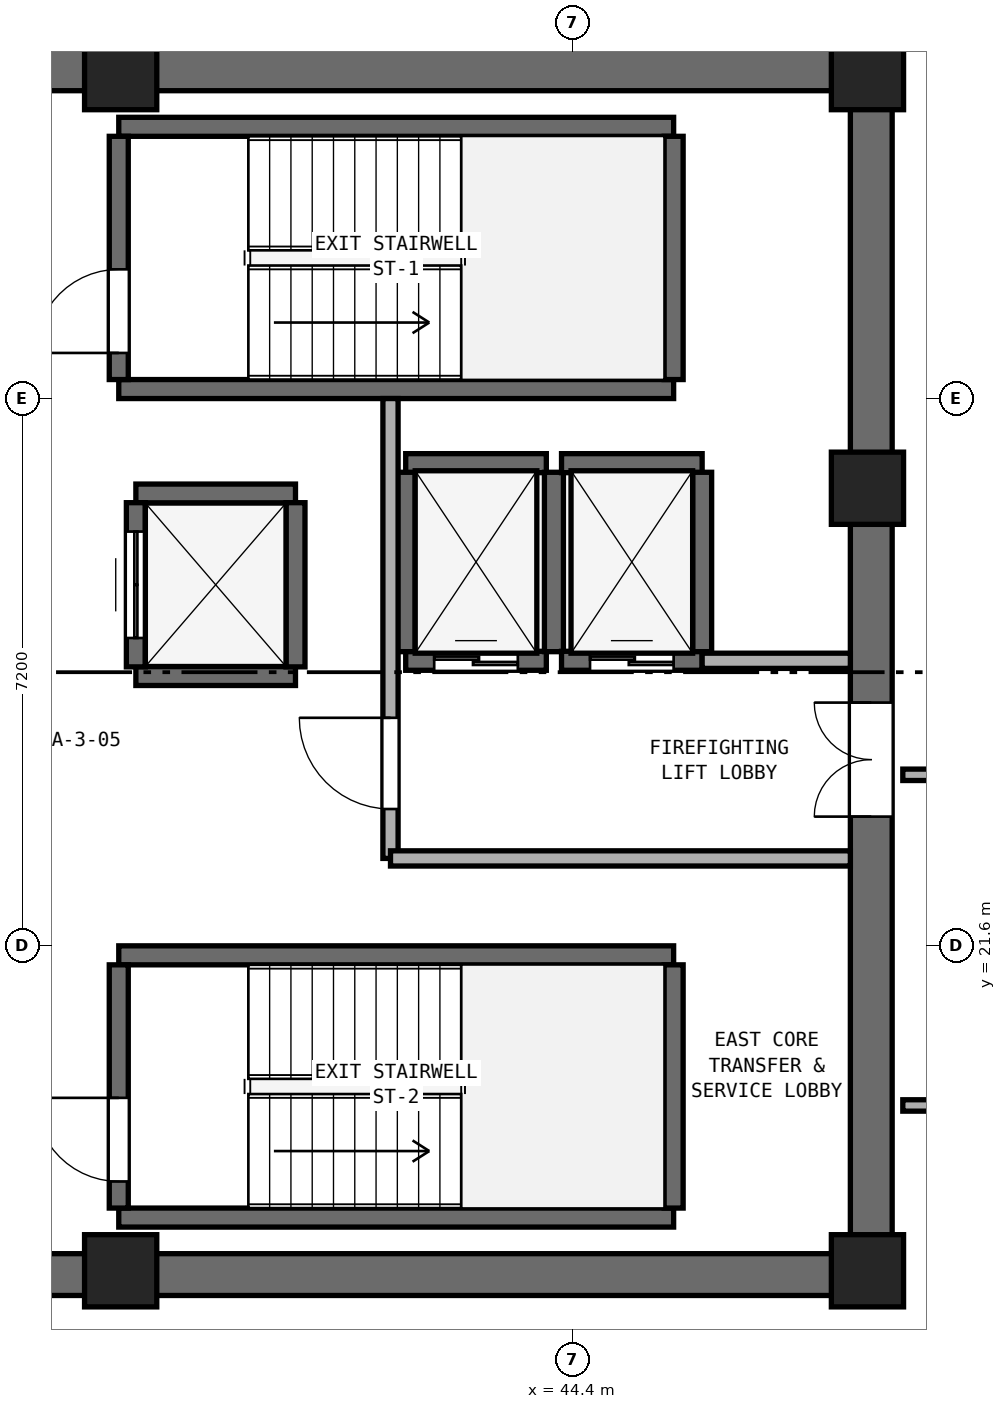
"""IFC4 building model, lengths in metres.
Left out: names, types, materials, properties, quantities, classifications, styles, units other than length and angle.
Written with IfcOpenShell. Run it as: python <this file> out.ifc"""

import sys

from ifc_helpers import new_model, si_unit, direction, frame, frame_2d, origin, origin_2d, place, context, subcontext, project, spatial, rectangle, extrude, element, fill, save


model = new_model("IFC4")
c1 = context("Model", 3, precision=1e-05, world=origin(), true_north=direction((0.0, 1.0)))
c2 = subcontext(c1, "Body", "Model", "MODEL_VIEW")
j1 = project(units=[si_unit("LENGTHUNIT", "METRE"), si_unit("PLANEANGLEUNIT", "RADIAN")], contexts=[c1])
p1 = place(None, origin())
s1 = spatial("IfcSite", under=j1, at=p1, CompositionType="ELEMENT")
p2 = place(p1, origin())
s2 = spatial("IfcBuilding", under=s1, at=p2, CompositionType="ELEMENT")
p3 = place(p2, frame((0.0, 0.0, 185.8)))
s3 = spatial("IfcBuildingStorey", under=s2, at=p3, CompositionType="ELEMENT", Elevation=185.8)
for number, where, z_axis, x_axis in (
    (1, (25.4, 17.275, 0.0), (0.0, 0.0, 1.0), (1.0, 0.0, 0.0)),
    (2, (25.4, 33.125, 0.0), (0.0, 0.0, 1.0), (1.0, 0.0, 0.0)),
):
    element("IfcWall", number, at=place(p3, frame(where, z_axis=z_axis, x_axis=x_axis)), inside=s3, PredefinedType="SHEAR", context=c2, shape_type="SweptSolid", body=[
        extrude(rectangle(XDim=23.2, YDim=0.55, at=frame_2d((11.6, 0.0))), origin(), (0.0, 0.0, 1.0), 3.54),
    ])
p4 = place(p3, frame((48.325, 17.55, 0.0), z_axis=(0.0, 0.0, 1.0), x_axis=(0.0, 1.0, 0.0)))
e3 = element("IfcWall", 3, at=p4, inside=s3, PredefinedType="SHEAR", context=c2, shape_type="SweptSolid", body=[
    extrude(rectangle(XDim=15.3, YDim=0.55, at=frame_2d((7.65, 0.0))), origin(), (0.0, 0.0, 1.0), 3.54),
])
p5 = place(p4, frame((5.75, 0.0, 0.0)))
e4 = element("IfcOpeningElement", 4, at=p5, cuts=e3, PredefinedType="OPENING", context=c2, shape_type="SweptSolid", body=[
    extrude(rectangle(XDim=1.5, YDim=2.15, at=frame_2d((0.75, 1.075))), frame((0.0, 0.285, 0.0), z_axis=(0.0, -1.0, 0.0), x_axis=(1.0, 0.0, 0.0)), (0.0, 0.0, 1.0), 0.57),
])
for number, where, z_axis, x_axis in (
    (5, (38.45, 17.325, 0.0), (0.0, 0.0, 1.0), (1.0, 0.0, 0.0)),
    (6, (48.275, 17.325, 0.0), (0.0, 0.0, 1.0), (1.0, 0.0, 0.0)),
    (7, (48.275, 27.62, 0.0), (0.0, 0.0, 1.0), (1.0, 0.0, 0.0)),
    (8, (48.275, 33.075, 0.0), (0.0, 0.0, 1.0), (1.0, 0.0, 0.0)),
    (9, (38.45, 33.075, 0.0), (0.0, 0.0, 1.0), (1.0, 0.0, 0.0)),
):
    element("IfcColumn", number, at=place(p3, frame(where, z_axis=z_axis, x_axis=x_axis)), inside=s3, PredefinedType="PILASTER", context=c2, shape_type="SweptSolid", body=[
        extrude(rectangle(XDim=0.95, YDim=0.95, at=origin_2d()), origin(), (0.0, 0.0, 1.0), 3.8),
    ])
for number, where, z_axis, x_axis in (
    (10, (38.425, 28.925, 0.0), (0.0, 0.0, 1.0), (1.0, 0.0, 0.0)),
    (11, (38.425, 32.375, 0.0), (0.0, 0.0, 1.0), (1.0, 0.0, 0.0)),
):
    element("IfcWall", number, at=place(p3, frame(where, z_axis=z_axis, x_axis=x_axis)), inside=s3, PredefinedType="SHEAR", context=c2, shape_type="SweptSolid", body=[
        extrude(rectangle(XDim=7.3, YDim=0.25, at=frame_2d((3.65, 0.0))), origin(), (0.0, 0.0, 1.0), 3.54),
    ])
p6 = place(p3, frame((38.425, 29.05, 0.0), z_axis=(0.0, 0.0, 1.0), x_axis=(0.0, 1.0, 0.0)))
e12 = element("IfcWall", 12, at=p6, inside=s3, PredefinedType="SHEAR", context=c2, shape_type="SweptSolid", body=[
    extrude(rectangle(XDim=3.2, YDim=0.25, at=frame_2d((1.6, 0.0))), origin(), (0.0, 0.0, 1.0), 3.54),
])
p7 = place(p6, frame((0.35, 0.0, 0.0)))
e13 = element("IfcOpeningElement", 13, at=p7, cuts=e12, PredefinedType="OPENING", context=c2, shape_type="SweptSolid", body=[
    extrude(rectangle(XDim=1.1, YDim=2.15, at=frame_2d((0.55, 1.075))), frame((0.0, 0.135, 0.0), z_axis=(0.0, -1.0, 0.0), x_axis=(1.0, 0.0, 0.0)), (0.0, 0.0, 1.0), 0.27),
])
p8 = place(p3, frame((45.725, 29.05, 0.0), z_axis=(0.0, 0.0, 1.0), x_axis=(0.0, 1.0, 0.0)))
e14 = element("IfcWall", 14, at=p8, inside=s3, PredefinedType="SHEAR", context=c2, shape_type="SweptSolid", body=[
    extrude(rectangle(XDim=3.2, YDim=0.25, at=frame_2d((1.6, 0.0))), origin(), (0.0, 0.0, 1.0), 3.54),
])
for number, where, z_axis, x_axis in (
    (15, (38.425, 18.025, 0.0), (0.0, 0.0, 1.0), (1.0, 0.0, 0.0)),
    (16, (38.425, 21.475, 0.0), (0.0, 0.0, 1.0), (1.0, 0.0, 0.0)),
):
    element("IfcWall", number, at=place(p3, frame(where, z_axis=z_axis, x_axis=x_axis)), inside=s3, PredefinedType="SHEAR", context=c2, shape_type="SweptSolid", body=[
        extrude(rectangle(XDim=7.3, YDim=0.25, at=frame_2d((3.65, 0.0))), origin(), (0.0, 0.0, 1.0), 3.54),
    ])
p9 = place(p3, frame((38.425, 18.15, 0.0), z_axis=(0.0, 0.0, 1.0), x_axis=(0.0, 1.0, 0.0)))
e17 = element("IfcWall", 17, at=p9, inside=s3, PredefinedType="SHEAR", context=c2, shape_type="SweptSolid", body=[
    extrude(rectangle(XDim=3.2, YDim=0.25, at=frame_2d((1.6, 0.0))), origin(), (0.0, 0.0, 1.0), 3.54),
])
p10 = place(p9, frame((0.35, 0.0, 0.0)))
e18 = element("IfcOpeningElement", 18, at=p10, cuts=e17, PredefinedType="OPENING", context=c2, shape_type="SweptSolid", body=[
    extrude(rectangle(XDim=1.1, YDim=2.15, at=frame_2d((0.55, 1.075))), frame((0.0, 0.135, 0.0), z_axis=(0.0, -1.0, 0.0), x_axis=(1.0, 0.0, 0.0)), (0.0, 0.0, 1.0), 0.27),
])
p11 = place(p3, frame((45.725, 18.15, 0.0), z_axis=(0.0, 0.0, 1.0), x_axis=(0.0, 1.0, 0.0)))
e19 = element("IfcWall", 19, at=p11, inside=s3, PredefinedType="SHEAR", context=c2, shape_type="SweptSolid", body=[
    extrude(rectangle(XDim=3.2, YDim=0.25, at=frame_2d((1.6, 0.0))), origin(), (0.0, 0.0, 1.0), 3.54),
])
p12 = place(p3, frame((42.2, 25.35, 0.0), z_axis=(0.0, 0.0, 1.0), x_axis=(1.0, 0.0, 0.0)))
e20 = element("IfcWall", 20, at=p12, inside=s3, PredefinedType="SHEAR", context=c2, shape_type="SweptSolid", body=[
    extrude(rectangle(XDim=1.85, YDim=0.25, at=frame_2d((0.925, 0.0))), origin(), (0.0, 0.0, 1.0), 3.54),
])
p13 = place(p12, frame((0.375, 0.0, 0.0)))
e21 = element("IfcOpeningElement", 21, at=p13, cuts=e20, PredefinedType="OPENING", context=c2, shape_type="SweptSolid", body=[
    extrude(rectangle(XDim=1.1, YDim=2.15, at=frame_2d((0.55, 1.075))), frame((0.0, 0.135, 0.0), z_axis=(0.0, -1.0, 0.0), x_axis=(1.0, 0.0, 0.0)), (0.0, 0.0, 1.0), 0.27),
])
p14 = place(p3, frame((42.2, 27.95, 0.0), z_axis=(0.0, 0.0, 1.0), x_axis=(1.0, 0.0, 0.0)))
e22 = element("IfcWall", 22, at=p14, inside=s3, PredefinedType="SHEAR", context=c2, shape_type="SweptSolid", body=[
    extrude(rectangle(XDim=1.85, YDim=0.25, at=frame_2d((0.925, 0.0))), origin(), (0.0, 0.0, 1.0), 3.54),
])
for number, where, z_axis, x_axis in (
    (23, (42.2, 25.47, 0.0), (0.0, 0.0, 1.0), (0.0, 1.0, 0.0)),
    (24, (44.15, 25.47, 0.0), (0.0, 0.0, 1.0), (0.0, 1.0, 0.0)),
):
    element("IfcWall", number, at=place(p3, frame(where, z_axis=z_axis, x_axis=x_axis)), inside=s3, PredefinedType="SHEAR", context=c2, shape_type="SweptSolid", body=[
        extrude(rectangle(XDim=2.36, YDim=0.25, at=frame_2d((1.18, 0.0))), origin(), (0.0, 0.0, 1.0), 3.54),
    ])
p15 = place(p3, frame((44.25, 25.35, 0.0), z_axis=(0.0, 0.0, 1.0), x_axis=(1.0, 0.0, 0.0)))
e25 = element("IfcWall", 25, at=p15, inside=s3, PredefinedType="SHEAR", context=c2, shape_type="SweptSolid", body=[
    extrude(rectangle(XDim=1.85, YDim=0.25, at=frame_2d((0.925, 0.0))), origin(), (0.0, 0.0, 1.0), 3.54),
])
p16 = place(p15, frame((0.375, 0.0, 0.0)))
e26 = element("IfcOpeningElement", 26, at=p16, cuts=e25, PredefinedType="OPENING", context=c2, shape_type="SweptSolid", body=[
    extrude(rectangle(XDim=1.1, YDim=2.15, at=frame_2d((0.55, 1.075))), frame((0.0, 0.135, 0.0), z_axis=(0.0, -1.0, 0.0), x_axis=(1.0, 0.0, 0.0)), (0.0, 0.0, 1.0), 0.27),
])
p17 = place(p3, frame((44.25, 27.95, 0.0), z_axis=(0.0, 0.0, 1.0), x_axis=(1.0, 0.0, 0.0)))
e27 = element("IfcWall", 27, at=p17, inside=s3, PredefinedType="SHEAR", context=c2, shape_type="SweptSolid", body=[
    extrude(rectangle(XDim=1.85, YDim=0.25, at=frame_2d((0.925, 0.0))), origin(), (0.0, 0.0, 1.0), 3.54),
])
p18 = place(p3, frame((46.1, 25.47, 0.0), z_axis=(0.0, 0.0, 1.0), x_axis=(0.0, 1.0, 0.0)))
e28 = element("IfcWall", 28, at=p18, inside=s3, PredefinedType="SHEAR", context=c2, shape_type="SweptSolid", body=[
    extrude(rectangle(XDim=2.36, YDim=0.25, at=frame_2d((1.18, 0.0))), origin(), (0.0, 0.0, 1.0), 3.54),
])
for number, where, z_axis, x_axis in (
    (29, (38.65, 25.15, 0.0), (0.0, 0.0, 1.0), (1.0, 0.0, 0.0)),
    (30, (38.65, 27.55, 0.0), (0.0, 0.0, 1.0), (1.0, 0.0, 0.0)),
):
    element("IfcWall", number, at=place(p3, frame(where, z_axis=z_axis, x_axis=x_axis)), inside=s3, PredefinedType="SHEAR", context=c2, shape_type="SweptSolid", body=[
        extrude(rectangle(XDim=2.1, YDim=0.25, at=frame_2d((1.05, 0.0))), origin(), (0.0, 0.0, 1.0), 3.54),
    ])
p19 = place(p3, frame((38.65, 25.27, 0.0), z_axis=(0.0, 0.0, 1.0), x_axis=(0.0, 1.0, 0.0)))
e31 = element("IfcWall", 31, at=p19, inside=s3, PredefinedType="SHEAR", context=c2, shape_type="SweptSolid", body=[
    extrude(rectangle(XDim=2.16, YDim=0.25, at=frame_2d((1.08, 0.0))), origin(), (0.0, 0.0, 1.0), 3.54),
])
p20 = place(p19, frame((0.38, 0.0, 0.0)))
e32 = element("IfcOpeningElement", 32, at=p20, cuts=e31, PredefinedType="OPENING", context=c2, shape_type="SweptSolid", body=[
    extrude(rectangle(XDim=1.4, YDim=2.2, at=frame_2d((0.7, 1.1))), frame((0.0, 0.135, 0.0), z_axis=(0.0, -1.0, 0.0), x_axis=(1.0, 0.0, 0.0)), (0.0, 0.0, 1.0), 0.27),
])
p21 = place(p3, frame((40.75, 25.27, 0.0), z_axis=(0.0, 0.0, 1.0), x_axis=(0.0, 1.0, 0.0)))
e33 = element("IfcWall", 33, at=p21, inside=s3, PredefinedType="SHEAR", context=c2, shape_type="SweptSolid", body=[
    extrude(rectangle(XDim=2.16, YDim=0.25, at=frame_2d((1.08, 0.0))), origin(), (0.0, 0.0, 1.0), 3.54),
])
p22 = place(p3, frame((42.0, 22.75, 0.0), z_axis=(0.0, 0.0, 1.0), x_axis=(0.0, 1.0, 0.0)))
e34 = element("IfcWall", 34, at=p22, inside=s3, PredefinedType="SOLIDWALL", context=c2, shape_type="SweptSolid", body=[
    extrude(rectangle(XDim=6.05, YDim=0.2, at=frame_2d((3.025, 0.0))), origin(), (0.0, 0.0, 1.0), 3.54),
])
p23 = place(p22, frame((0.65, 0.0, 0.0)))
e35 = element("IfcOpeningElement", 35, at=p23, cuts=e34, PredefinedType="OPENING", context=c2, shape_type="SweptSolid", body=[
    extrude(rectangle(XDim=1.2, YDim=2.15, at=frame_2d((0.6, 1.075))), frame((0.0, 0.11, 0.0), z_axis=(0.0, -1.0, 0.0), x_axis=(1.0, 0.0, 0.0)), (0.0, 0.0, 1.0), 0.22),
])
p24 = place(p3, frame((42.0, 22.75, 0.0), z_axis=(0.0, 0.0, 1.0), x_axis=(1.0, 0.0, 0.0)))
e36 = element("IfcWall", 36, at=p24, inside=s3, PredefinedType="SOLIDWALL", context=c2, shape_type="SweptSolid", body=[
    extrude(rectangle(XDim=6.05, YDim=0.2, at=frame_2d((3.025, 0.0))), origin(), (0.0, 0.0, 1.0), 3.54),
])
p25 = place(p3, frame((46.1, 25.35, 0.0), z_axis=(0.0, 0.0, 1.0), x_axis=(1.0, 0.0, 0.0)))
e37 = element("IfcWall", 37, at=p25, inside=s3, PredefinedType="SOLIDWALL", context=c2, shape_type="SweptSolid", body=[
    extrude(rectangle(XDim=1.95, YDim=0.2, at=frame_2d((0.975, 0.0))), origin(), (0.0, 0.0, 1.0), 3.54),
])
p26 = place(p3, frame((48.74, 19.5, 0.0), z_axis=(0.0, 0.0, 1.0), x_axis=(1.0, 0.0, 0.0)))
e38 = element("IfcWall", 38, at=p26, inside=s3, PredefinedType="PARTITIONING", context=c2, shape_type="SweptSolid", body=[
    extrude(rectangle(XDim=12.855, YDim=0.15, at=frame_2d((6.427, 0.0))), origin(), (0.0, 0.0, 1.0), 3.54),
])
p27 = place(p3, frame((48.74, 23.85, 0.0), z_axis=(0.0, 0.0, 1.0), x_axis=(1.0, 0.0, 0.0)))
e39 = element("IfcWall", 39, at=p27, inside=s3, PredefinedType="PARTITIONING", context=c2, shape_type="SweptSolid", body=[
    extrude(rectangle(XDim=12.855, YDim=0.15, at=frame_2d((6.427, 0.0))), origin(), (0.0, 0.0, 1.0), 3.54),
])
p28 = place(p27, frame((5.927, 0.0, 0.0)))
e40 = element("IfcOpeningElement", 40, at=p28, cuts=e39, PredefinedType="OPENING", context=c2, shape_type="SweptSolid", body=[
    extrude(rectangle(XDim=1.0, YDim=2.12, at=frame_2d((0.5, 1.06))), frame((0.0, 0.085, 0.0), z_axis=(0.0, -1.0, 0.0), x_axis=(1.0, 0.0, 0.0)), (0.0, 0.0, 1.0), 0.17),
])
p29 = place(p7, origin())
e41 = element("IfcDoor", 41, at=p29, inside=s3, OperationType="SINGLE_SWING_LEFT", PredefinedType="DOOR", context=c2, shape_type="SweptSolid", body=[
    extrude(rectangle(XDim=1.1, YDim=2.15, at=frame_2d((0.55, 1.075))), frame((0.0, 0.025, 0.0), z_axis=(0.0, -1.0, 0.0), x_axis=(1.0, 0.0, 0.0)), (0.0, 0.0, 1.0), 0.05),
])
fill(e13, e41)
p30 = place(p10, origin())
e42 = element("IfcDoor", 42, at=p30, inside=s3, OperationType="SINGLE_SWING_RIGHT", PredefinedType="DOOR", context=c2, shape_type="SweptSolid", body=[
    extrude(rectangle(XDim=1.1, YDim=2.15, at=frame_2d((0.55, 1.075))), frame((0.0, 0.025, 0.0), z_axis=(0.0, -1.0, 0.0), x_axis=(1.0, 0.0, 0.0)), (0.0, 0.0, 1.0), 0.05),
])
fill(e18, e42)
p31 = place(p13, origin())
e43 = element("IfcDoor", 43, at=p31, inside=s3, OperationType="DOUBLE_DOOR_SLIDING", PredefinedType="DOOR", context=c2, shape_type="SweptSolid", body=[
    extrude(rectangle(XDim=1.1, YDim=2.15, at=frame_2d((0.55, 1.075))), frame((0.0, 0.025, 0.0), z_axis=(0.0, -1.0, 0.0), x_axis=(1.0, 0.0, 0.0)), (0.0, 0.0, 1.0), 0.05),
])
fill(e21, e43)
p32 = place(p16, origin())
e44 = element("IfcDoor", 44, at=p32, inside=s3, OperationType="DOUBLE_DOOR_SLIDING", PredefinedType="DOOR", context=c2, shape_type="SweptSolid", body=[
    extrude(rectangle(XDim=1.1, YDim=2.15, at=frame_2d((0.55, 1.075))), frame((0.0, 0.025, 0.0), z_axis=(0.0, -1.0, 0.0), x_axis=(1.0, 0.0, 0.0)), (0.0, 0.0, 1.0), 0.05),
])
fill(e26, e44)
p33 = place(p20, origin())
e45 = element("IfcDoor", 45, at=p33, inside=s3, OperationType="DOUBLE_DOOR_SLIDING", PredefinedType="DOOR", context=c2, shape_type="SweptSolid", body=[
    extrude(rectangle(XDim=1.4, YDim=2.2, at=frame_2d((0.7, 1.1))), frame((0.0, 0.025, 0.0), z_axis=(0.0, -1.0, 0.0), x_axis=(1.0, 0.0, 0.0)), (0.0, 0.0, 1.0), 0.05),
])
fill(e32, e45)
p34 = place(p23, origin())
e46 = element("IfcDoor", 46, at=p34, inside=s3, OperationType="SINGLE_SWING_RIGHT", PredefinedType="DOOR", context=c2, shape_type="SweptSolid", body=[
    extrude(rectangle(XDim=1.2, YDim=2.15, at=frame_2d((0.6, 1.075))), frame((0.0, 0.025, 0.0), z_axis=(0.0, -1.0, 0.0), x_axis=(1.0, 0.0, 0.0)), (0.0, 0.0, 1.0), 0.05),
])
fill(e35, e46)
p35 = place(p5, origin())
e47 = element("IfcDoor", 47, at=p35, inside=s3, OperationType="DOUBLE_DOOR_SINGLE_SWING", PredefinedType="DOOR", context=c2, shape_type="SweptSolid", body=[
    extrude(rectangle(XDim=1.5, YDim=2.15, at=frame_2d((0.75, 1.075))), frame((0.0, 0.025, 0.0), z_axis=(0.0, -1.0, 0.0), x_axis=(1.0, 0.0, 0.0)), (0.0, 0.0, 1.0), 0.05),
])
fill(e4, e47)
save(model, sys.argv[1])
